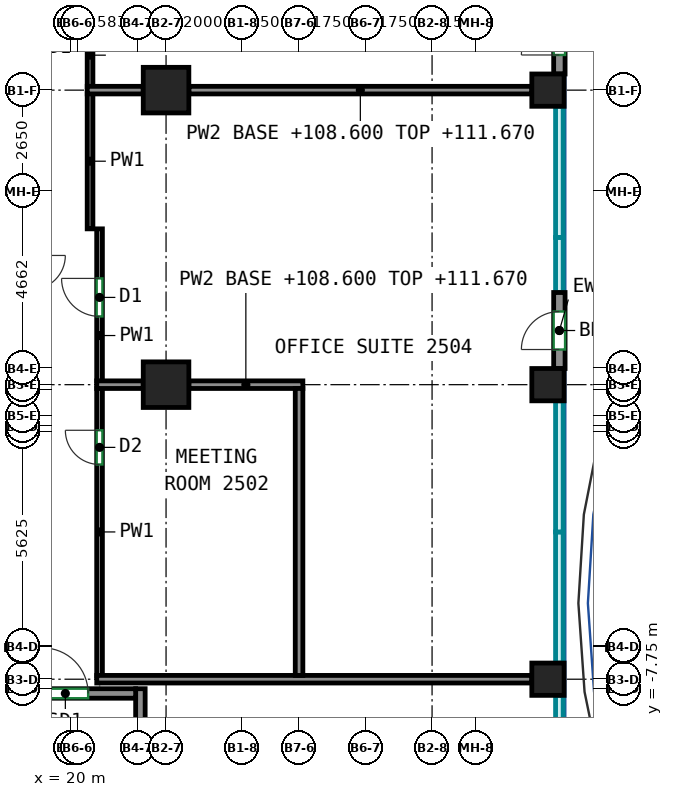
"""IFC4 building model, lengths in metres.
Left out: names, types, materials, properties, quantities, classifications, styles, units other than length and angle.
Written with IfcOpenShell. Run it as: python <this file> out.ifc"""

import sys

from ifc_helpers import new_model, si_unit, direction, frame, frame_2d, origin, origin_2d, place, context, subcontext, project, spatial, rectangle, extrude, source, transform, mapped, element, fill, save


model = new_model("IFC4")
c1 = context("Model", 3, precision=1e-05, world=origin(), true_north=direction((0.0, 1.0)))
c2 = subcontext(c1, "Body", "Model", "MODEL_VIEW")
j1 = project(units=[si_unit("LENGTHUNIT", "METRE"), si_unit("PLANEANGLEUNIT", "RADIAN")], contexts=[c1])
p1 = place(None, origin())
s1 = spatial("IfcSite", under=j1, at=p1, CompositionType="ELEMENT")
p2 = place(p1, origin())
s2 = spatial("IfcBuilding", under=s1, at=p2, CompositionType="ELEMENT")
p3 = place(p2, frame((0.0, 0.0, 108.6)))
s3 = spatial("IfcBuildingStorey", under=s2, at=p3, CompositionType="ELEMENT", Elevation=108.6)
m1 = source(origin(), c2, "Body", "SweptSolid", [
    extrude(rectangle(XDim=1.2, YDim=1.2, at=origin_2d()), origin(), (0.0, 0.0, 1.0), 3.72),
])
for number, where, z_axis, x_axis in (
    (1, (22.5, 0.25, 0.0), (0.0, 0.0, 1.0), (1.0, 0.0, 0.0)),
    (2, (22.5, 8.0, 0.0), (0.0, 0.0, 1.0), (1.0, 0.0, 0.0)),
):
    element("IfcColumn", number, at=place(p3, frame(where, z_axis=z_axis, x_axis=x_axis)), inside=s3, PredefinedType="COLUMN", context=c2, shape_type="MappedRepresentation", body=[
        mapped(m1, transform((0.0, 0.0, 0.0))),
    ])
m2 = source(origin(), c2, "Body", "SweptSolid", [
    extrude(rectangle(XDim=0.85, YDim=0.85, at=origin_2d()), origin(), (0.0, 0.0, 1.0), 3.72),
])
for number, where, z_axis, x_axis in (
    (3, (32.55, -7.5, 0.0), (0.0, 0.0, 1.0), (1.0, 0.0, 0.0)),
    (4, (32.55, 0.25, 0.0), (0.0, 0.0, 1.0), (1.0, 0.0, 0.0)),
    (5, (32.55, 8.0, 0.0), (0.0, 0.0, 1.0), (1.0, 0.0, 0.0)),
):
    element("IfcColumn", number, at=place(p3, frame(where, z_axis=z_axis, x_axis=x_axis)), inside=s3, PredefinedType="COLUMN", context=c2, shape_type="MappedRepresentation", body=[
        mapped(m2, transform((0.0, 0.0, 0.0))),
    ])
m3 = source(origin(), c2, "Body", "SweptSolid", [
    extrude(rectangle(XDim=8.0, YDim=0.25, at=frame_2d((4.0, 0.0))), origin(), (0.0, 0.0, 1.0), 3.72),
])
p4 = place(p3, frame((21.825, -15.75, 0.0), z_axis=(0.0, 0.0, 1.0), x_axis=(0.0, 1.0, 0.0)))
e6 = element("IfcWall", 6, at=p4, inside=s3, PredefinedType="SHEAR", context=c2, shape_type="MappedRepresentation", body=[
    mapped(m3, transform((0.0, 0.0, 0.0))),
])
m4 = source(origin(), c2, "Body", "SweptSolid", [
    extrude(rectangle(XDim=3.7, YDim=0.25, at=frame_2d((1.85, 0.0))), origin(), (0.0, 0.0, 1.0), 3.72),
])
p5 = place(p3, frame((18.0, -7.875, 0.0), z_axis=(0.0, 0.0, 1.0), x_axis=(1.0, 0.0, 0.0)))
e7 = element("IfcWall", 7, at=p5, inside=s3, PredefinedType="SHEAR", context=c2, shape_type="MappedRepresentation", body=[
    mapped(m4, transform((0.0, 0.0, 0.0))),
])
p6 = place(p5, frame((1.25, 0.0, 0.0)))
e8 = element("IfcOpeningElement", 8, at=p6, cuts=e7, PredefinedType="OPENING", context=c2, shape_type="SweptSolid", body=[
    extrude(rectangle(XDim=1.2, YDim=2.1, at=frame_2d((0.6, 1.05))), frame((0.0, 0.135, 0.0), z_axis=(0.0, -1.0, 0.0), x_axis=(1.0, 0.0, 0.0)), (0.0, 0.0, 1.0), 0.27),
])
m5 = source(origin(), c2, "Body", "SweptSolid", [
    extrude(rectangle(XDim=2.0, YDim=0.3, at=frame_2d((1.0, 0.0))), origin(), (0.0, 0.0, 1.0), 3.72),
])
p7 = place(p3, frame((32.85, 0.675, 0.0), z_axis=(0.0, 0.0, 1.0), x_axis=(0.0, 1.0, 0.0)))
e9 = element("IfcWall", 9, at=p7, inside=s3, PredefinedType="SOLIDWALL", context=c2, shape_type="MappedRepresentation", body=[
    mapped(m5, transform((0.0, 0.0, 0.0))),
])
p8 = place(p7, frame((0.5, 0.0, 0.0)))
e10 = element("IfcOpeningElement", 10, at=p8, cuts=e9, PredefinedType="OPENING", context=c2, shape_type="SweptSolid", body=[
    extrude(rectangle(XDim=1.0, YDim=2.1, at=frame_2d((0.5, 1.05))), frame((0.0, 0.16, 0.0), z_axis=(0.0, -1.0, 0.0), x_axis=(1.0, 0.0, 0.0)), (0.0, 0.0, 1.0), 0.32),
])
p9 = place(p3, frame((32.85, 8.425, 0.0), z_axis=(0.0, 0.0, 1.0), x_axis=(0.0, 1.0, 0.0)))
e11 = element("IfcWall", 11, at=p9, inside=s3, PredefinedType="SOLIDWALL", context=c2, shape_type="MappedRepresentation", body=[
    mapped(m5, transform((0.0, 0.0, 0.0))),
])
p10 = place(p9, frame((0.5, 0.0, 0.0)))
e12 = element("IfcOpeningElement", 12, at=p10, cuts=e11, PredefinedType="OPENING", context=c2, shape_type="SweptSolid", body=[
    extrude(rectangle(XDim=1.0, YDim=2.1, at=frame_2d((0.5, 1.05))), frame((0.0, 0.16, 0.0), z_axis=(0.0, -1.0, 0.0), x_axis=(1.0, 0.0, 0.0)), (0.0, 0.0, 1.0), 0.32),
])
p11 = place(p3, frame((20.75, -7.41, 0.0), z_axis=(0.0, 0.0, 1.0), x_axis=(0.0, 1.0, 0.0)))
e13 = element("IfcWall", 13, at=p11, inside=s3, PredefinedType="PARTITIONING", context=c2, shape_type="SweptSolid", body=[
    extrude(rectangle(XDim=7.57, YDim=0.15, at=frame_2d((3.785, 0.0))), origin(), (0.0, 0.0, 1.0), 3.72),
])
p12 = place(p11, frame((5.56, 0.0, 0.0)))
e14 = element("IfcOpeningElement", 14, at=p12, cuts=e13, PredefinedType="OPENING", context=c2, shape_type="SweptSolid", body=[
    extrude(rectangle(XDim=0.9, YDim=2.1, at=frame_2d((0.45, 1.05))), frame((0.0, 0.085, 0.0), z_axis=(0.0, -1.0, 0.0), x_axis=(1.0, 0.0, 0.0)), (0.0, 0.0, 1.0), 0.17),
])
p13 = place(p3, frame((20.5, 4.35, 0.0), z_axis=(0.0, 0.0, 1.0), x_axis=(0.0, 1.0, 0.0)))
e15 = element("IfcWall", 15, at=p13, inside=s3, PredefinedType="PARTITIONING", context=c2, shape_type="SweptSolid", body=[
    extrude(rectangle(XDim=3.56, YDim=0.15, at=frame_2d((1.78, 0.0))), origin(), (0.0, 0.0, 1.0), 3.72),
])
p14 = place(p3, frame((20.75, 0.34, 0.0), z_axis=(0.0, 0.0, 1.0), x_axis=(0.0, 1.0, 0.0)))
e16 = element("IfcWall", 16, at=p14, inside=s3, PredefinedType="PARTITIONING", context=c2, shape_type="SweptSolid", body=[
    extrude(rectangle(XDim=4.01, YDim=0.15, at=frame_2d((2.005, 0.0))), origin(), (0.0, 0.0, 1.0), 3.72),
])
p15 = place(p14, frame((1.706, 0.0, 0.0)))
e17 = element("IfcOpeningElement", 17, at=p15, cuts=e16, PredefinedType="OPENING", context=c2, shape_type="SweptSolid", body=[
    extrude(rectangle(XDim=1.0, YDim=2.1, at=frame_2d((0.5, 1.05))), frame((0.0, 0.085, 0.0), z_axis=(0.0, -1.0, 0.0), x_axis=(1.0, 0.0, 0.0)), (0.0, 0.0, 1.0), 0.17),
])
p16 = place(p3, frame((20.5, 8.09, 0.0), z_axis=(0.0, 0.0, 1.0), x_axis=(0.0, 1.0, 0.0)))
e18 = element("IfcWall", 18, at=p16, inside=s3, PredefinedType="PARTITIONING", context=c2, shape_type="SweptSolid", body=[
    extrude(rectangle(XDim=1.66, YDim=0.15, at=frame_2d((0.83, 0.0))), origin(), (0.0, 0.0, 1.0), 3.72),
])
p17 = place(p3, frame((20.676, -7.5, 0.0), z_axis=(0.0, 0.0, 1.0), x_axis=(1.0, 0.0, 0.0)))
e19 = element("IfcWall", 19, at=p17, inside=s3, PredefinedType="PARTITIONING", context=c2, shape_type="SweptSolid", body=[
    extrude(rectangle(XDim=11.449, YDim=0.2, at=frame_2d((5.725, 0.0))), origin(), (0.0, 0.0, 1.0), 3.72),
])
p18 = place(p3, frame((20.676, 0.25, 0.0), z_axis=(0.0, 0.0, 1.0), x_axis=(1.0, 0.0, 0.0)))
e20 = element("IfcWall", 20, at=p18, inside=s3, PredefinedType="PARTITIONING", context=c2, shape_type="SweptSolid", body=[
    extrude(rectangle(XDim=1.224, YDim=0.2, at=frame_2d((0.612, 0.0))), origin(), (0.0, 0.0, 1.0), 3.72),
])
p19 = place(p3, frame((23.1, 0.25, 0.0), z_axis=(0.0, 0.0, 1.0), x_axis=(1.0, 0.0, 0.0)))
e21 = element("IfcWall", 21, at=p19, inside=s3, PredefinedType="PARTITIONING", context=c2, shape_type="SweptSolid", body=[
    extrude(rectangle(XDim=3.0, YDim=0.2, at=frame_2d((1.5, 0.0))), origin(), (0.0, 0.0, 1.0), 3.07),
])
p20 = place(p3, frame((26.0, -7.4, 0.0), z_axis=(0.0, 0.0, 1.0), x_axis=(0.0, 1.0, 0.0)))
e22 = element("IfcWall", 22, at=p20, inside=s3, PredefinedType="PARTITIONING", context=c2, shape_type="SweptSolid", body=[
    extrude(rectangle(XDim=7.55, YDim=0.2, at=frame_2d((3.775, 0.0))), origin(), (0.0, 0.0, 1.0), 3.72),
])
p21 = place(p3, frame((20.426, 8.0, 0.0), z_axis=(0.0, 0.0, 1.0), x_axis=(1.0, 0.0, 0.0)))
e23 = element("IfcWall", 23, at=p21, inside=s3, PredefinedType="PARTITIONING", context=c2, shape_type="SweptSolid", body=[
    extrude(rectangle(XDim=1.474, YDim=0.2, at=frame_2d((0.737, 0.0))), origin(), (0.0, 0.0, 1.0), 3.72),
])
p22 = place(p3, frame((23.1, 8.0, 0.0), z_axis=(0.0, 0.0, 1.0), x_axis=(1.0, 0.0, 0.0)))
e24 = element("IfcWall", 24, at=p22, inside=s3, PredefinedType="PARTITIONING", context=c2, shape_type="SweptSolid", body=[
    extrude(rectangle(XDim=9.025, YDim=0.2, at=frame_2d((4.512, 0.0))), origin(), (0.0, 0.0, 1.0), 3.07),
])
p23 = place(p8, origin())
e25 = element("IfcDoor", 25, at=p23, inside=s3, OperationType="SINGLE_SWING_LEFT", PredefinedType="DOOR", context=c2, shape_type="SweptSolid", body=[
    extrude(rectangle(XDim=1.0, YDim=2.1, at=frame_2d((0.5, 1.05))), frame((0.0, 0.025, 0.0), z_axis=(0.0, -1.0, 0.0), x_axis=(1.0, 0.0, 0.0)), (0.0, 0.0, 1.0), 0.05),
])
fill(e10, e25)
p24 = place(p10, origin())
e26 = element("IfcDoor", 26, at=p24, inside=s3, OperationType="SINGLE_SWING_LEFT", PredefinedType="DOOR", context=c2, shape_type="SweptSolid", body=[
    extrude(rectangle(XDim=1.0, YDim=2.1, at=frame_2d((0.5, 1.05))), frame((0.0, 0.025, 0.0), z_axis=(0.0, -1.0, 0.0), x_axis=(1.0, 0.0, 0.0)), (0.0, 0.0, 1.0), 0.05),
])
fill(e12, e26)
p25 = place(p6, origin())
e27 = element("IfcDoor", 27, at=p25, inside=s3, OperationType="DOUBLE_DOOR_SINGLE_SWING", PredefinedType="DOOR", context=c2, shape_type="SweptSolid", body=[
    extrude(rectangle(XDim=1.2, YDim=2.1, at=frame_2d((0.6, 1.05))), frame((0.0, 0.025, 0.0), z_axis=(0.0, -1.0, 0.0), x_axis=(1.0, 0.0, 0.0)), (0.0, 0.0, 1.0), 0.05),
])
fill(e8, e27)
p26 = place(p12, origin())
e28 = element("IfcDoor", 28, at=p26, inside=s3, OperationType="SINGLE_SWING_RIGHT", PredefinedType="DOOR", context=c2, shape_type="SweptSolid", body=[
    extrude(rectangle(XDim=0.9, YDim=2.1, at=frame_2d((0.45, 1.05))), frame((0.0, 0.025, 0.0), z_axis=(0.0, -1.0, 0.0), x_axis=(1.0, 0.0, 0.0)), (0.0, 0.0, 1.0), 0.05),
])
fill(e14, e28)
p27 = place(p15, origin())
e29 = element("IfcDoor", 29, at=p27, inside=s3, OperationType="SINGLE_SWING_RIGHT", PredefinedType="DOOR", context=c2, shape_type="SweptSolid", body=[
    extrude(rectangle(XDim=1.0, YDim=2.1, at=frame_2d((0.5, 1.05))), frame((0.0, 0.025, 0.0), z_axis=(0.0, -1.0, 0.0), x_axis=(1.0, 0.0, 0.0)), (0.0, 0.0, 1.0), 0.05),
])
fill(e17, e29)
save(model, sys.argv[1])
